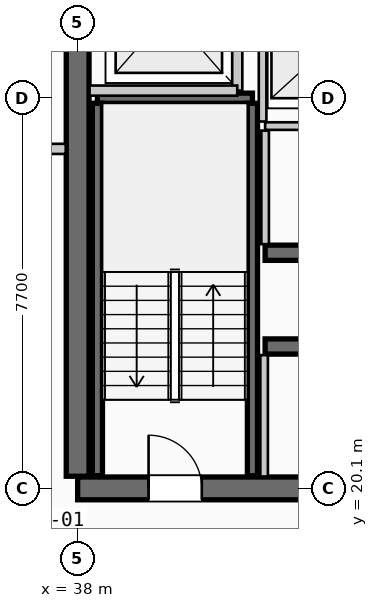
"""IFC4 building model, lengths in metres.
Left out: names, types, materials, properties, quantities, classifications, styles, units other than length and angle.
Written with IfcOpenShell. Run it as: python <this file> out.ifc"""

import sys

from ifc_helpers import new_model, si_unit, direction, frame, frame_2d, origin, place, context, subcontext, project, spatial, rectangle, extrude, source, transform, mapped, element, fill, save


model = new_model("IFC4")
c1 = context("Model", 3, precision=1e-05, world=origin(), true_north=direction((0.0, 1.0)))
c2 = subcontext(c1, "Body", "Model", "MODEL_VIEW")
j1 = project(units=[si_unit("LENGTHUNIT", "METRE"), si_unit("PLANEANGLEUNIT", "RADIAN")], contexts=[c1])
p1 = place(None, origin())
s1 = spatial("IfcSite", under=j1, at=p1, CompositionType="ELEMENT")
p2 = place(p1, origin())
s2 = spatial("IfcBuilding", under=s1, at=p2, CompositionType="ELEMENT")
p3 = place(p2, frame((0.0, 0.0, 238.75)))
s3 = spatial("IfcBuildingStorey", under=s2, at=p3, CompositionType="ELEMENT", Elevation=238.75)
p4 = place(p3, frame((38.0, 20.1, 0.0), z_axis=(0.0, 0.0, 1.0), x_axis=(1.0, 0.0, 0.0)))
e1 = element("IfcWall", 1, at=p4, inside=s3, PredefinedType="SHEAR", context=c2, shape_type="SweptSolid", body=[
    extrude(rectangle(XDim=17.6, YDim=0.45, at=frame_2d((8.8, 0.0))), origin(), (0.0, 0.0, 1.0), 3.21),
])
p5 = place(p4, frame((1.4, 0.0, 0.0)))
e2 = element("IfcOpeningElement", 2, at=p5, cuts=e1, PredefinedType="OPENING", context=c2, shape_type="SweptSolid", body=[
    extrude(rectangle(XDim=1.05, YDim=2.15, at=frame_2d((0.525, 1.075))), frame((0.0, 0.235, 0.0), z_axis=(0.0, -1.0, 0.0), x_axis=(1.0, 0.0, 0.0)), (0.0, 0.0, 1.0), 0.47),
])
p6 = place(p4, frame((15.15, 0.0, 0.0)))
e3 = element("IfcOpeningElement", 3, at=p6, cuts=e1, PredefinedType="OPENING", context=c2, shape_type="SweptSolid", body=[
    extrude(rectangle(XDim=1.05, YDim=2.15, at=frame_2d((0.525, 1.075))), frame((0.0, 0.235, 0.0), z_axis=(0.0, -1.0, 0.0), x_axis=(1.0, 0.0, 0.0)), (0.0, 0.0, 1.0), 0.47),
])
p7 = place(p4, frame((5.25, 0.0, 0.0)))
e4 = element("IfcOpeningElement", 4, at=p7, cuts=e1, PredefinedType="OPENING", context=c2, shape_type="SweptSolid", body=[
    extrude(rectangle(XDim=0.9, YDim=2.15, at=frame_2d((0.45, 1.075))), frame((0.0, 0.235, 0.0), z_axis=(0.0, -1.0, 0.0), x_axis=(1.0, 0.0, 0.0)), (0.0, 0.0, 1.0), 0.47),
])
p8 = place(p4, frame((11.4, 0.0, 0.0)))
e5 = element("IfcOpeningElement", 5, at=p8, cuts=e1, PredefinedType="OPENING", context=c2, shape_type="SweptSolid", body=[
    extrude(rectangle(XDim=0.95, YDim=2.15, at=frame_2d((0.475, 1.075))), frame((0.0, 0.235, 0.0), z_axis=(0.0, -1.0, 0.0), x_axis=(1.0, 0.0, 0.0)), (0.0, 0.0, 1.0), 0.47),
])
p9 = place(p3, frame((38.0, 35.26, 0.0), z_axis=(0.0, 0.0, 1.0), x_axis=(0.0, -1.0, 0.0)))
e6 = element("IfcWall", 6, at=p9, inside=s3, PredefinedType="SHEAR", context=c2, shape_type="SweptSolid", body=[
    extrude(rectangle(XDim=14.92, YDim=0.45, at=frame_2d((7.46, 0.0))), origin(), (0.0, 0.0, 1.0), 3.21),
])
p10 = place(p9, frame((5.21, 0.0, 0.0)))
e7 = element("IfcOpeningElement", 7, at=p10, cuts=e6, PredefinedType="OPENING", context=c2, shape_type="SweptSolid", body=[
    extrude(rectangle(XDim=1.1, YDim=2.2, at=frame_2d((0.55, 1.1))), frame((0.0, 0.235, 0.0), z_axis=(0.0, -1.0, 0.0), x_axis=(1.0, 0.0, 0.0)), (0.0, 0.0, 1.0), 0.47),
])
p11 = place(p3, frame((41.7, 22.9, 0.0), z_axis=(0.0, 0.0, 1.0), x_axis=(1.0, 0.0, 0.0)))
e8 = element("IfcWall", 8, at=p11, inside=s3, PredefinedType="SHEAR", context=c2, shape_type="SweptSolid", body=[
    extrude(rectangle(XDim=4.25, YDim=0.3, at=frame_2d((2.125, 0.0))), origin(), (0.0, 0.0, 1.0), 3.21),
])
p12 = place(p3, frame((41.7, 24.75, 0.0), z_axis=(0.0, 0.0, 1.0), x_axis=(1.0, 0.0, 0.0)))
e9 = element("IfcWall", 9, at=p12, inside=s3, PredefinedType="SHEAR", context=c2, shape_type="SweptSolid", body=[
    extrude(rectangle(XDim=4.25, YDim=0.3, at=frame_2d((2.125, 0.0))), origin(), (0.0, 0.0, 1.0), 3.21),
])
p13 = place(p12, frame((1.55, 0.0, 0.0)))
e10 = element("IfcOpeningElement", 10, at=p13, cuts=e9, PredefinedType="OPENING", context=c2, shape_type="SweptSolid", body=[
    extrude(rectangle(XDim=0.95, YDim=2.15, at=frame_2d((0.475, 1.075))), frame((0.0, 0.16, 0.0), z_axis=(0.0, -1.0, 0.0), x_axis=(1.0, 0.0, 0.0)), (0.0, 0.0, 1.0), 0.32),
])
p14 = place(p3, frame((38.39, 27.8, 0.0), z_axis=(0.0, 0.0, 1.0), x_axis=(1.0, 0.0, 0.0)))
e11 = element("IfcWall", 11, at=p14, inside=s3, PredefinedType="SHEAR", context=c2, shape_type="SweptSolid", body=[
    extrude(rectangle(XDim=3.06, YDim=0.2, at=frame_2d((1.53, 0.0))), origin(), (0.0, 0.0, 1.0), 3.21),
])
for number, where, z_axis, x_axis in (
    (12, (41.45, 27.7, 0.0), (0.0, 0.0, 1.0), (0.0, -1.0, 0.0)),
    (13, (38.39, 20.35, 0.0), (0.0, 0.0, 1.0), (0.0, 1.0, 0.0)),
):
    element("IfcWall", number, at=place(p3, frame(where, z_axis=z_axis, x_axis=x_axis)), inside=s3, PredefinedType="SHEAR", context=c2, shape_type="SweptSolid", body=[
        extrude(rectangle(XDim=7.35, YDim=0.2, at=frame_2d((3.675, 0.0))), origin(), (0.0, 0.0, 1.0), 3.21),
    ])
p15 = place(p3, frame((41.15, 27.95, 0.0), z_axis=(0.0, 0.0, 1.0), x_axis=(0.0, 1.0, 0.0)))
e14 = element("IfcWall", 14, at=p15, inside=s3, PredefinedType="PARTITIONING", context=c2, shape_type="SweptSolid", body=[
    extrude(rectangle(XDim=3.1, YDim=0.2, at=frame_2d((1.55, 0.0))), origin(), (0.0, 0.0, 1.0), 2.28),
])
p16 = place(p3, frame((38.235, 27.95, 0.0), z_axis=(0.0, 0.0, 1.0), x_axis=(1.0, 0.0, 0.0)))
e15 = element("IfcWall", 15, at=p16, inside=s3, PredefinedType="PARTITIONING", context=c2, shape_type="SweptSolid", body=[
    extrude(rectangle(XDim=2.915, YDim=0.2, at=frame_2d((1.458, 0.0))), origin(), (0.0, 0.0, 1.0), 2.28),
])
p17 = place(p3, frame((34.5, 26.8, 0.0), z_axis=(0.0, 0.0, 1.0), x_axis=(1.0, 0.0, 0.0)))
e16 = element("IfcWall", 16, at=p17, inside=s3, PredefinedType="PARTITIONING", context=c2, shape_type="SweptSolid", body=[
    extrude(rectangle(XDim=3.265, YDim=0.2, at=frame_2d((1.632, 0.0))), origin(), (0.0, 0.0, 1.0), 2.28),
])
p18 = place(p3, frame((41.68, 20.335, 0.0), z_axis=(0.0, 0.0, 1.0), x_axis=(0.0, 1.0, 0.0)))
e17 = element("IfcWall", 17, at=p18, inside=s3, PredefinedType="PARTITIONING", context=c2, shape_type="SweptSolid", body=[
    extrude(rectangle(XDim=2.395, YDim=0.15, at=frame_2d((1.198, 0.0))), origin(), (0.0, 0.0, 1.0), 2.28),
])
p19 = place(p3, frame((41.7, 27.25, 0.0), z_axis=(0.0, 0.0, 1.0), x_axis=(1.0, 0.0, 0.0)))
e18 = element("IfcWall", 18, at=p19, inside=s3, PredefinedType="PARTITIONING", context=c2, shape_type="SweptSolid", body=[
    extrude(rectangle(XDim=4.25, YDim=0.15, at=frame_2d((2.125, 0.0))), origin(), (0.0, 0.0, 1.0), 2.28),
])
p20 = place(p3, frame((41.7, 24.92, 0.0), z_axis=(0.0, 0.0, 1.0), x_axis=(0.0, 1.0, 0.0)))
e19 = element("IfcWall", 19, at=p20, inside=s3, PredefinedType="PARTITIONING", context=c2, shape_type="SweptSolid", body=[
    extrude(rectangle(XDim=2.24, YDim=0.15, at=frame_2d((1.12, 0.0))), origin(), (0.0, 0.0, 1.0), 2.28),
])
p21 = place(p3, frame((41.65, 27.34, 0.0), z_axis=(0.0, 0.0, 1.0), x_axis=(0.0, 1.0, 0.0)))
e20 = element("IfcWall", 20, at=p21, inside=s3, PredefinedType="PARTITIONING", context=c2, shape_type="SweptSolid", body=[
    extrude(rectangle(XDim=2.34, YDim=0.15, at=frame_2d((1.17, 0.0))), origin(), (0.0, 0.0, 1.0), 2.28),
])
m1 = source(origin(), c2, "Body", "SweptSolid", [
    extrude(rectangle(XDim=1.05, YDim=2.15, at=frame_2d((0.525, 1.075))), frame((0.0, 0.025, 0.0), z_axis=(0.0, -1.0, 0.0), x_axis=(1.0, 0.0, 0.0)), (0.0, 0.0, 1.0), 0.05),
])
p22 = place(p5, origin())
e21 = element("IfcDoor", 21, at=p22, inside=s3, OperationType="SINGLE_SWING_LEFT", PredefinedType="DOOR", context=c2, shape_type="MappedRepresentation", body=[
    mapped(m1, transform((0.0, 0.0, 0.0), scale=1.0)),
])
fill(e2, e21)
save(model, sys.argv[1])
